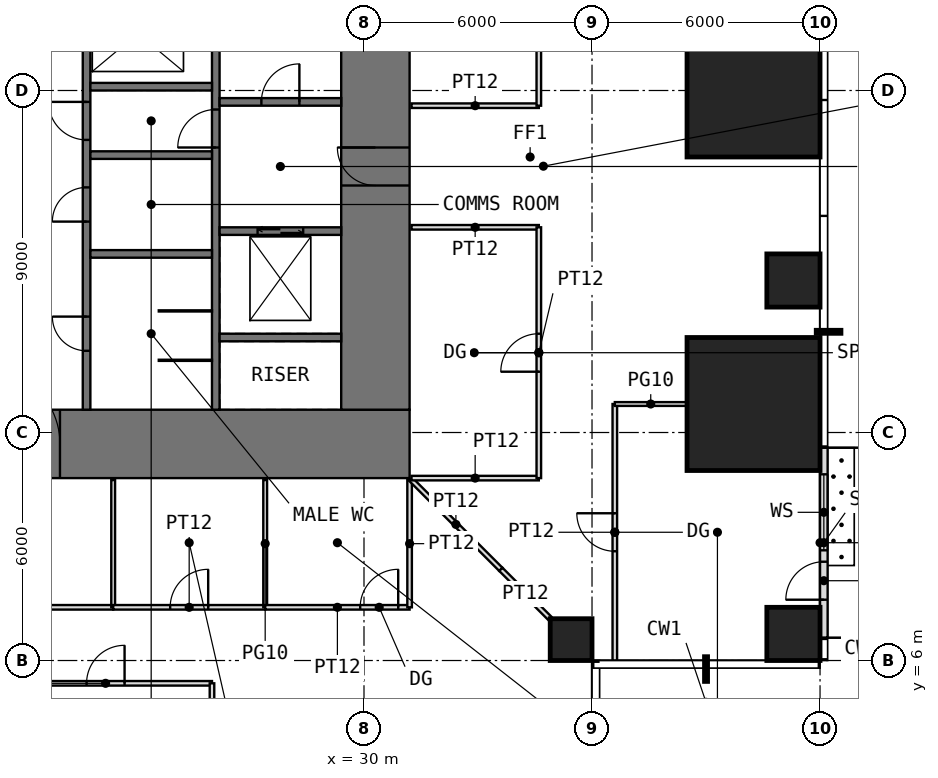
"""IFC4 building model, lengths in metres.
Left out: names, types, materials, properties, quantities, classifications, styles, units other than length and angle.
Written with IfcOpenShell. Run it as: python <this file> out.ifc"""

import sys

from ifc_helpers import new_model, si_unit, direction, frame, frame_2d, origin, origin_2d, place, context, subcontext, project, spatial, rectangle, extrude, element, fill, save


model = new_model("IFC4")
c1 = context("Model", 3, precision=1e-05, world=origin(), true_north=direction((0.0, 1.0)))
c2 = subcontext(c1, "Body", "Model", "MODEL_VIEW")
j1 = project(units=[si_unit("LENGTHUNIT", "METRE"), si_unit("PLANEANGLEUNIT", "RADIAN")], contexts=[c1])
p1 = place(None, origin())
s1 = spatial("IfcSite", under=j1, at=p1, CompositionType="ELEMENT")
p2 = place(p1, origin())
s2 = spatial("IfcBuilding", under=s1, at=p2, CompositionType="ELEMENT")
p3 = place(p2, frame((0.0, 0.0, 42.5)))
s3 = spatial("IfcBuildingStorey", under=s2, at=p3, CompositionType="ELEMENT", Elevation=42.5)
p4 = place(p3, frame((35.45, 6.55, 0.0), z_axis=(0.0, 0.0, 1.0), x_axis=(1.0, 0.0, 0.0)))
e1 = element("IfcColumn", 1, at=p4, inside=s3, PredefinedType="COLUMN", context=c2, shape_type="SweptSolid", body=[
    extrude(rectangle(XDim=1.1, YDim=1.1, at=origin_2d()), origin(), (0.0, 0.0, 1.0), 4.0),
])
p5 = place(p3, frame((41.3, 6.7, 0.0), z_axis=(0.0, 0.0, 1.0), x_axis=(1.0, 0.0, 0.0)))
e2 = element("IfcColumn", 2, at=p5, inside=s3, PredefinedType="COLUMN", context=c2, shape_type="SweptSolid", body=[
    extrude(rectangle(XDim=1.4, YDim=1.4, at=origin_2d()), origin(), (0.0, 0.0, 1.0), 4.0),
])
p6 = place(p3, frame((40.25, 12.75, 0.0), z_axis=(0.0, 0.0, 1.0), x_axis=(1.0, 0.0, 0.0)))
e3 = element("IfcColumn", 3, at=p6, inside=s3, PredefinedType="COLUMN", context=c2, shape_type="SweptSolid", body=[
    extrude(rectangle(XDim=3.5, YDim=3.5, at=origin_2d()), origin(), (0.0, 0.0, 1.0), 4.0),
])
p7 = place(p3, frame((41.3, 16.0, 0.0), z_axis=(0.0, 0.0, 1.0), x_axis=(1.0, 0.0, 0.0)))
e4 = element("IfcColumn", 4, at=p7, inside=s3, PredefinedType="COLUMN", context=c2, shape_type="SweptSolid", body=[
    extrude(rectangle(XDim=1.4, YDim=1.4, at=origin_2d()), origin(), (0.0, 0.0, 1.0), 4.0),
])
p8 = place(p3, frame((40.25, 21.0, 0.0), z_axis=(0.0, 0.0, 1.0), x_axis=(1.0, 0.0, 0.0)))
e5 = element("IfcColumn", 5, at=p8, inside=s3, PredefinedType="COLUMN", context=c2, shape_type="SweptSolid", body=[
    extrude(rectangle(XDim=3.5, YDim=3.5, at=origin_2d()), origin(), (0.0, 0.0, 1.0), 4.0),
])
p9 = place(p3, frame((42.1, 6.6, 0.0), z_axis=(0.0, 0.0, 1.0), x_axis=(0.0, 1.0, 0.0)))
e6 = element("IfcWall", 6, at=p9, inside=s3, PredefinedType="USERDEFINED", context=c2, shape_type="SweptSolid", body=[
    extrude(rectangle(XDim=5.0, YDim=0.2, at=frame_2d((2.5, 0.0))), origin(), (0.0, 0.0, 1.0), 3.75),
])
p10 = place(p9, frame((1.0, 0.0, 0.0)))
e7 = element("IfcOpeningElement", 7, at=p10, cuts=e6, PredefinedType="OPENING", context=c2, shape_type="SweptSolid", body=[
    extrude(rectangle(XDim=1.0, YDim=2.4, at=frame_2d((0.5, 1.2))), frame((0.0, 0.11, 0.0), z_axis=(0.0, -1.0, 0.0), x_axis=(1.0, 0.0, 0.0)), (0.0, 0.0, 1.0), 0.22),
])
p11 = place(p9, frame((2.3, 0.0, 0.3)))
e8 = element("IfcOpeningElement", 8, at=p11, cuts=e6, PredefinedType="OPENING", context=c2, shape_type="SweptSolid", body=[
    extrude(rectangle(XDim=2.0, YDim=2.7, at=frame_2d((1.0, 1.35))), frame((0.0, 0.11, 0.0), z_axis=(0.0, -1.0, 0.0), x_axis=(1.0, 0.0, 0.0)), (0.0, 0.0, 1.0), 0.22),
])
p12 = place(p3, frame((10.8, 11.7, -0.05), z_axis=(0.0, 0.0, 1.0), x_axis=(1.0, 0.0, 0.0)))
e9 = element("IfcWall", 9, at=p12, inside=s3, PredefinedType="SHEAR", context=c2, shape_type="SweptSolid", body=[
    extrude(rectangle(XDim=20.4, YDim=1.8, at=frame_2d((10.2, 0.0))), origin(), (0.0, 0.0, 1.0), 4.0),
])
p13 = place(p12, frame((9.2, 0.0, 0.05)))
e10 = element("IfcOpeningElement", 10, at=p13, cuts=e9, PredefinedType="OPENING", context=c2, shape_type="SweptSolid", body=[
    extrude(rectangle(XDim=2.0, YDim=2.2, at=frame_2d((1.0, 1.1))), frame((0.0, 0.91, 0.0), z_axis=(0.0, -1.0, 0.0), x_axis=(1.0, 0.0, 0.0)), (0.0, 0.0, 1.0), 1.82),
])
p14 = place(p3, frame((30.3, 12.6, -0.05), z_axis=(0.0, 0.0, 1.0), x_axis=(0.0, 1.0, 0.0)))
e11 = element("IfcWall", 11, at=p14, inside=s3, PredefinedType="SHEAR", context=c2, shape_type="SweptSolid", body=[
    extrude(rectangle(XDim=16.8, YDim=1.8, at=frame_2d((8.4, 0.0))), origin(), (0.0, 0.0, 1.0), 4.0),
])
p15 = place(p14, frame((5.9, 0.0, 0.05)))
e12 = element("IfcOpeningElement", 12, at=p15, cuts=e11, PredefinedType="OPENING", context=c2, shape_type="SweptSolid", body=[
    extrude(rectangle(XDim=1.0, YDim=2.2, at=frame_2d((0.5, 1.1))), frame((0.0, 0.91, 0.0), z_axis=(0.0, -1.0, 0.0), x_axis=(1.0, 0.0, 0.0)), (0.0, 0.0, 1.0), 1.82),
])
p16 = place(p3, frame((22.7, 12.6, -0.05), z_axis=(0.0, 0.0, 1.0), x_axis=(0.0, 1.0, 0.0)))
e13 = element("IfcWall", 13, at=p16, inside=s3, PredefinedType="SHEAR", context=c2, shape_type="SweptSolid", body=[
    extrude(rectangle(XDim=16.8, YDim=0.2, at=frame_2d((8.4, 0.0))), origin(), (0.0, 0.0, 1.0), 4.0),
])
p17 = place(p16, frame((7.1, 0.0, 0.05)))
e14 = element("IfcOpeningElement", 14, at=p17, cuts=e13, PredefinedType="OPENING", context=c2, shape_type="SweptSolid", body=[
    extrude(rectangle(XDim=1.0, YDim=2.2, at=frame_2d((0.5, 1.1))), frame((0.0, 0.11, 0.0), z_axis=(0.0, -1.0, 0.0), x_axis=(1.0, 0.0, 0.0)), (0.0, 0.0, 1.0), 0.22),
])
p18 = place(p16, frame((1.55, 0.0, 0.05)))
e15 = element("IfcOpeningElement", 15, at=p18, cuts=e13, PredefinedType="OPENING", context=c2, shape_type="SweptSolid", body=[
    extrude(rectangle(XDim=0.9, YDim=2.2, at=frame_2d((0.45, 1.1))), frame((0.0, 0.11, 0.0), z_axis=(0.0, -1.0, 0.0), x_axis=(1.0, 0.0, 0.0)), (0.0, 0.0, 1.0), 0.22),
])
p19 = place(p16, frame((4.95, 0.0, 0.05)))
e16 = element("IfcOpeningElement", 16, at=p19, cuts=e13, PredefinedType="OPENING", context=c2, shape_type="SweptSolid", body=[
    extrude(rectangle(XDim=0.9, YDim=2.2, at=frame_2d((0.45, 1.1))), frame((0.0, 0.11, 0.0), z_axis=(0.0, -1.0, 0.0), x_axis=(1.0, 0.0, 0.0)), (0.0, 0.0, 1.0), 0.22),
])
p20 = place(p3, frame((26.1, 12.6, -0.05), z_axis=(0.0, 0.0, 1.0), x_axis=(0.0, 1.0, 0.0)))
e17 = element("IfcWall", 17, at=p20, inside=s3, PredefinedType="SHEAR", context=c2, shape_type="SweptSolid", body=[
    extrude(rectangle(XDim=16.8, YDim=0.2, at=frame_2d((8.4, 0.0))), origin(), (0.0, 0.0, 1.0), 4.0),
])
p21 = place(p20, frame((6.9, 0.0, 0.05)))
e18 = element("IfcOpeningElement", 18, at=p21, cuts=e17, PredefinedType="OPENING", context=c2, shape_type="SweptSolid", body=[
    extrude(rectangle(XDim=1.0, YDim=2.2, at=frame_2d((0.5, 1.1))), frame((0.0, 0.11, 0.0), z_axis=(0.0, -1.0, 0.0), x_axis=(1.0, 0.0, 0.0)), (0.0, 0.0, 1.0), 0.22),
])
for number, where, z_axis, x_axis in (
    (19, (22.8, 16.7, -0.05), (0.0, 0.0, 1.0), (1.0, 0.0, 0.0)),
    (20, (22.8, 19.3, -0.05), (0.0, 0.0, 1.0), (1.0, 0.0, 0.0)),
    (21, (22.8, 21.1, -0.05), (0.0, 0.0, 1.0), (1.0, 0.0, 0.0)),
    (22, (26.2, 14.5, -0.05), (0.0, 0.0, 1.0), (1.0, 0.0, 0.0)),
):
    element("IfcWall", number, at=place(p3, frame(where, z_axis=z_axis, x_axis=x_axis)), inside=s3, PredefinedType="SHEAR", context=c2, shape_type="SweptSolid", body=[
        extrude(rectangle(XDim=3.2, YDim=0.2, at=frame_2d((1.6, 0.0))), origin(), (0.0, 0.0, 1.0), 4.0),
    ])
p22 = place(p3, frame((26.2, 17.3, -0.05), z_axis=(0.0, 0.0, 1.0), x_axis=(1.0, 0.0, 0.0)))
e23 = element("IfcWall", 23, at=p22, inside=s3, PredefinedType="SHEAR", context=c2, shape_type="SweptSolid", body=[
    extrude(rectangle(XDim=3.2, YDim=0.2, at=frame_2d((1.6, 0.0))), origin(), (0.0, 0.0, 1.0), 4.0),
])
p23 = place(p22, frame((1.0, 0.0, 0.05)))
e24 = element("IfcOpeningElement", 24, at=p23, cuts=e23, PredefinedType="OPENING", context=c2, shape_type="SweptSolid", body=[
    extrude(rectangle(XDim=1.2, YDim=2.2, at=frame_2d((0.6, 1.1))), frame((0.0, 0.11, 0.0), z_axis=(0.0, -1.0, 0.0), x_axis=(1.0, 0.0, 0.0)), (0.0, 0.0, 1.0), 0.22),
])
p24 = place(p3, frame((26.2, 20.7, -0.05), z_axis=(0.0, 0.0, 1.0), x_axis=(1.0, 0.0, 0.0)))
e25 = element("IfcWall", 25, at=p24, inside=s3, PredefinedType="SHEAR", context=c2, shape_type="SweptSolid", body=[
    extrude(rectangle(XDim=3.2, YDim=0.2, at=frame_2d((1.6, 0.0))), origin(), (0.0, 0.0, 1.0), 4.0),
])
p25 = place(p24, frame((1.1, 0.0, 0.05)))
e26 = element("IfcOpeningElement", 26, at=p25, cuts=e25, PredefinedType="OPENING", context=c2, shape_type="SweptSolid", body=[
    extrude(rectangle(XDim=1.0, YDim=2.2, at=frame_2d((0.5, 1.1))), frame((0.0, 0.11, 0.0), z_axis=(0.0, -1.0, 0.0), x_axis=(1.0, 0.0, 0.0)), (0.0, 0.0, 1.0), 0.22),
])
for number, where, z_axis, x_axis in (
    (27, (24.6, 13.9, 0.0), (0.0, 0.0, 1.0), (1.0, 0.0, 0.0)),
    (28, (24.6, 15.2, 0.0), (0.0, 0.0, 1.0), (1.0, 0.0, 0.0)),
):
    element("IfcWall", number, at=place(p3, frame(where, z_axis=z_axis, x_axis=x_axis)), inside=s3, PredefinedType="PARTITIONING", context=c2, shape_type="SweptSolid", body=[
        extrude(rectangle(XDim=1.4, YDim=0.03, at=frame_2d((0.7, 0.0))), origin(), (0.0, 0.0, 1.0), 3.75),
    ])
p26 = place(p3, frame((18.6, 7.4, 0.0), z_axis=(0.0, 0.0, 1.0), x_axis=(1.0, 0.0, 0.0)))
e29 = element("IfcWall", 29, at=p26, inside=s3, PredefinedType="PARTITIONING", context=c2, shape_type="SweptSolid", body=[
    extrude(rectangle(XDim=4.8, YDim=0.12, at=frame_2d((2.4, 0.0))), origin(), (0.0, 0.0, 1.0), 3.75),
])
p27 = place(p26, frame((1.9, 0.0, 0.0)))
e30 = element("IfcOpeningElement", 30, at=p27, cuts=e29, PredefinedType="OPENING", context=c2, shape_type="SweptSolid", body=[
    extrude(rectangle(XDim=1.0, YDim=2.4, at=frame_2d((0.5, 1.2))), frame((0.0, 0.07, 0.0), z_axis=(0.0, -1.0, 0.0), x_axis=(1.0, 0.0, 0.0)), (0.0, 0.0, 1.0), 0.14),
])
p28 = place(p3, frame((21.0, 5.4, 0.0), z_axis=(0.0, 0.0, 1.0), x_axis=(1.0, 0.0, 0.0)))
e31 = element("IfcWall", 31, at=p28, inside=s3, PredefinedType="PARTITIONING", context=c2, shape_type="SweptSolid", body=[
    extrude(rectangle(XDim=5.0, YDim=0.12, at=frame_2d((2.5, 0.0))), origin(), (0.0, 0.0, 1.0), 3.75),
])
p29 = place(p28, frame((1.7, 0.0, 0.0)))
e32 = element("IfcOpeningElement", 32, at=p29, cuts=e31, PredefinedType="OPENING", context=c2, shape_type="SweptSolid", body=[
    extrude(rectangle(XDim=1.0, YDim=2.2, at=frame_2d((0.5, 1.1))), frame((0.0, 0.07, 0.0), z_axis=(0.0, -1.0, 0.0), x_axis=(1.0, 0.0, 0.0)), (0.0, 0.0, 1.0), 0.14),
])
p30 = place(p3, frame((23.4, 7.4, 0.0), z_axis=(0.0, 0.0, 1.0), x_axis=(0.0, 1.0, 0.0)))
e33 = element("IfcWall", 33, at=p30, inside=s3, PredefinedType="PARTITIONING", context=c2, shape_type="SweptSolid", body=[
    extrude(rectangle(XDim=3.35, YDim=0.1, at=frame_2d((1.675, 0.0))), origin(), (0.0, 0.0, 1.0), 3.75),
])
p31 = place(p3, frame((23.4, 7.4, 0.0), z_axis=(0.0, 0.0, 1.0), x_axis=(1.0, 0.0, 0.0)))
e34 = element("IfcWall", 34, at=p31, inside=s3, PredefinedType="PARTITIONING", context=c2, shape_type="SweptSolid", body=[
    extrude(rectangle(XDim=4.0, YDim=0.12, at=frame_2d((2.0, 0.0))), origin(), (0.0, 0.0, 1.0), 3.75),
])
p32 = place(p31, frame((1.5, 0.0, 0.0)))
e35 = element("IfcOpeningElement", 35, at=p32, cuts=e34, PredefinedType="OPENING", context=c2, shape_type="SweptSolid", body=[
    extrude(rectangle(XDim=1.0, YDim=2.4, at=frame_2d((0.5, 1.2))), frame((0.0, 0.07, 0.0), z_axis=(0.0, -1.0, 0.0), x_axis=(1.0, 0.0, 0.0)), (0.0, 0.0, 1.0), 0.14),
])
p33 = place(p3, frame((26.0, 1.41, 0.0), z_axis=(0.0, 0.0, 1.0), x_axis=(0.0, 1.0, 0.0)))
e36 = element("IfcWall", 36, at=p33, inside=s3, PredefinedType="PARTITIONING", context=c2, shape_type="SweptSolid", body=[
    extrude(rectangle(XDim=3.99, YDim=0.12, at=frame_2d((1.995, 0.0))), origin(), (0.0, 0.0, 1.0), 3.75),
])
p34 = place(p3, frame((27.4, 7.4, 0.0), z_axis=(0.0, 0.0, 1.0), x_axis=(0.0, 1.0, 0.0)))
e37 = element("IfcWall", 37, at=p34, inside=s3, PredefinedType="PARTITIONING", context=c2, shape_type="SweptSolid", body=[
    extrude(rectangle(XDim=3.35, YDim=0.1, at=frame_2d((1.675, 0.0))), origin(), (0.0, 0.0, 1.0), 3.75),
])
p35 = place(p3, frame((27.4, 7.4, 0.0), z_axis=(0.0, 0.0, 1.0), x_axis=(1.0, 0.0, 0.0)))
e38 = element("IfcWall", 38, at=p35, inside=s3, PredefinedType="PARTITIONING", context=c2, shape_type="SweptSolid", body=[
    extrude(rectangle(XDim=3.8, YDim=0.12, at=frame_2d((1.9, 0.0))), origin(), (0.0, 0.0, 1.0), 3.75),
])
p36 = place(p35, frame((2.5, 0.0, 0.0)))
e39 = element("IfcOpeningElement", 39, at=p36, cuts=e38, PredefinedType="OPENING", context=c2, shape_type="SweptSolid", body=[
    extrude(rectangle(XDim=1.0, YDim=2.4, at=frame_2d((0.5, 1.2))), frame((0.0, 0.07, 0.0), z_axis=(0.0, -1.0, 0.0), x_axis=(1.0, 0.0, 0.0)), (0.0, 0.0, 1.0), 0.14),
])
p37 = place(p3, frame((31.2, 7.4, 0.0), z_axis=(0.0, 0.0, 1.0), x_axis=(0.0, 1.0, 0.0)))
e40 = element("IfcWall", 40, at=p37, inside=s3, PredefinedType="PARTITIONING", context=c2, shape_type="SweptSolid", body=[
    extrude(rectangle(XDim=3.35, YDim=0.12, at=frame_2d((1.675, 0.0))), origin(), (0.0, 0.0, 1.0), 3.75),
])
p38 = place(p3, frame((31.235, 10.765, 0.0), z_axis=(0.0, 0.0, 1.0), x_axis=(0.707106781187, -0.707106781187, 0.0)))
e41 = element("IfcWall", 41, at=p38, inside=s3, PredefinedType="PARTITIONING", context=c2, shape_type="SweptSolid", body=[
    extrude(rectangle(XDim=3.346, YDim=0.12, at=frame_2d((1.673, 0.0))), origin(), (0.0, 0.0, 1.0), 3.75),
])
for number, where, z_axis, x_axis in (
    (42, (31.25, 10.8, 0.0), (0.0, 0.0, 1.0), (1.0, 0.0, 0.0)),
    (43, (31.25, 17.4, 0.0), (0.0, 0.0, 1.0), (1.0, 0.0, 0.0)),
    (44, (31.25, 20.6, 0.0), (0.0, 0.0, 1.0), (1.0, 0.0, 0.0)),
):
    element("IfcWall", number, at=place(p3, frame(where, z_axis=z_axis, x_axis=x_axis)), inside=s3, PredefinedType="PARTITIONING", context=c2, shape_type="SweptSolid", body=[
        extrude(rectangle(XDim=3.35, YDim=0.12, at=frame_2d((1.675, 0.0))), origin(), (0.0, 0.0, 1.0), 3.75),
    ])
p39 = place(p3, frame((33.602, 8.398, 0.0), z_axis=(0.0, 0.0, 1.0), x_axis=(0.707106781187, -0.707106781187, 0.0)))
e45 = element("IfcWall", 45, at=p39, inside=s3, PredefinedType="PARTITIONING", context=c2, shape_type="SweptSolid", body=[
    extrude(rectangle(XDim=1.822, YDim=0.12, at=frame_2d((0.911, 0.0))), origin(), (0.0, 0.0, 1.0), 3.75),
])
p40 = place(p3, frame((34.6, 10.8, 0.0), z_axis=(0.0, 0.0, 1.0), x_axis=(0.0, 1.0, 0.0)))
e46 = element("IfcWall", 46, at=p40, inside=s3, PredefinedType="PARTITIONING", context=c2, shape_type="SweptSolid", body=[
    extrude(rectangle(XDim=6.6, YDim=0.12, at=frame_2d((3.3, 0.0))), origin(), (0.0, 0.0, 1.0), 3.75),
])
p41 = place(p40, frame((2.8, 0.0, 0.0)))
e47 = element("IfcOpeningElement", 47, at=p41, cuts=e46, PredefinedType="OPENING", context=c2, shape_type="SweptSolid", body=[
    extrude(rectangle(XDim=1.0, YDim=2.4, at=frame_2d((0.5, 1.2))), frame((0.0, 0.07, 0.0), z_axis=(0.0, -1.0, 0.0), x_axis=(1.0, 0.0, 0.0)), (0.0, 0.0, 1.0), 0.14),
])
p42 = place(p3, frame((34.6, 20.6, 0.0), z_axis=(0.0, 0.0, 1.0), x_axis=(0.0, 1.0, 0.0)))
e48 = element("IfcWall", 48, at=p42, inside=s3, PredefinedType="PARTITIONING", context=c2, shape_type="SweptSolid", body=[
    extrude(rectangle(XDim=4.8, YDim=0.12, at=frame_2d((2.4, 0.0))), origin(), (0.0, 0.0, 1.0), 3.75),
])
p43 = place(p42, frame((1.9, 0.0, 0.0)))
e49 = element("IfcOpeningElement", 49, at=p43, cuts=e48, PredefinedType="OPENING", context=c2, shape_type="SweptSolid", body=[
    extrude(rectangle(XDim=1.0, YDim=2.4, at=frame_2d((0.5, 1.2))), frame((0.0, 0.07, 0.0), z_axis=(0.0, -1.0, 0.0), x_axis=(1.0, 0.0, 0.0)), (0.0, 0.0, 1.0), 0.14),
])
p44 = place(p3, frame((36.6, 6.0, 0.0), z_axis=(0.0, 0.0, 1.0), x_axis=(0.0, 1.0, 0.0)))
e50 = element("IfcWall", 50, at=p44, inside=s3, PredefinedType="PARTITIONING", context=c2, shape_type="SweptSolid", body=[
    extrude(rectangle(XDim=6.75, YDim=0.12, at=frame_2d((3.375, 0.0))), origin(), (0.0, 0.0, 1.0), 3.75),
])
p45 = place(p44, frame((2.875, 0.0, 0.0)))
e51 = element("IfcOpeningElement", 51, at=p45, cuts=e50, PredefinedType="OPENING", context=c2, shape_type="SweptSolid", body=[
    extrude(rectangle(XDim=1.0, YDim=2.4, at=frame_2d((0.5, 1.2))), frame((0.0, 0.07, 0.0), z_axis=(0.0, -1.0, 0.0), x_axis=(1.0, 0.0, 0.0)), (0.0, 0.0, 1.0), 0.14),
])
p46 = place(p3, frame((36.6, 12.75, 0.0), z_axis=(0.0, 0.0, 1.0), x_axis=(1.0, 0.0, 0.0)))
e52 = element("IfcWall", 52, at=p46, inside=s3, PredefinedType="PARTITIONING", context=c2, shape_type="SweptSolid", body=[
    extrude(rectangle(XDim=1.89, YDim=0.1, at=frame_2d((0.945, 0.0))), origin(), (0.0, 0.0, 1.0), 3.75),
])
p47 = place(p10, origin())
e53 = element("IfcDoor", 53, at=p47, inside=s3, OperationType="SINGLE_SWING_LEFT", PredefinedType="DOOR", context=c2, shape_type="SweptSolid", body=[
    extrude(rectangle(XDim=1.0, YDim=2.4, at=frame_2d((0.5, 1.2))), frame((0.0, 0.025, 0.0), z_axis=(0.0, -1.0, 0.0), x_axis=(1.0, 0.0, 0.0)), (0.0, 0.0, 1.0), 0.05),
])
fill(e7, e53)
p48 = place(p11, origin())
e54 = element("IfcWindow", 54, at=p48, inside=s3, PartitioningType="SINGLE_PANEL", PredefinedType="WINDOW", context=c2, shape_type="SweptSolid", body=[
    extrude(rectangle(XDim=2.0, YDim=2.7, at=frame_2d((1.0, 1.35))), frame((0.0, 0.03, 0.0), z_axis=(0.0, -1.0, 0.0), x_axis=(1.0, 0.0, 0.0)), (0.0, 0.0, 1.0), 0.06),
])
fill(e8, e54)
p49 = place(p13, origin())
e55 = element("IfcDoor", 55, at=p49, inside=s3, OperationType="DOUBLE_DOOR_SINGLE_SWING", PredefinedType="DOOR", context=c2, shape_type="SweptSolid", body=[
    extrude(rectangle(XDim=2.0, YDim=2.2, at=frame_2d((1.0, 1.1))), frame((0.0, 0.025, 0.0), z_axis=(0.0, -1.0, 0.0), x_axis=(1.0, 0.0, 0.0)), (0.0, 0.0, 1.0), 0.05),
])
fill(e10, e55)
p50 = place(p15, origin())
e56 = element("IfcDoor", 56, at=p50, inside=s3, OperationType="SINGLE_SWING_RIGHT", PredefinedType="DOOR", context=c2, shape_type="SweptSolid", body=[
    extrude(rectangle(XDim=1.0, YDim=2.2, at=frame_2d((0.5, 1.1))), frame((0.0, 0.025, 0.0), z_axis=(0.0, -1.0, 0.0), x_axis=(1.0, 0.0, 0.0)), (0.0, 0.0, 1.0), 0.05),
])
fill(e12, e56)
p51 = place(p25, origin())
e57 = element("IfcDoor", 57, at=p51, inside=s3, OperationType="SINGLE_SWING_RIGHT", PredefinedType="DOOR", context=c2, shape_type="SweptSolid", body=[
    extrude(rectangle(XDim=1.0, YDim=2.2, at=frame_2d((0.5, 1.1))), frame((0.0, 0.025, 0.0), z_axis=(0.0, -1.0, 0.0), x_axis=(1.0, 0.0, 0.0)), (0.0, 0.0, 1.0), 0.05),
])
fill(e26, e57)
p52 = place(p21, origin())
e58 = element("IfcDoor", 58, at=p52, inside=s3, OperationType="SINGLE_SWING_LEFT", PredefinedType="DOOR", context=c2, shape_type="SweptSolid", body=[
    extrude(rectangle(XDim=1.0, YDim=2.2, at=frame_2d((0.5, 1.1))), frame((0.0, 0.025, 0.0), z_axis=(0.0, -1.0, 0.0), x_axis=(1.0, 0.0, 0.0)), (0.0, 0.0, 1.0), 0.05),
])
fill(e18, e58)
p53 = place(p17, origin())
e59 = element("IfcDoor", 59, at=p53, inside=s3, OperationType="SINGLE_SWING_RIGHT", PredefinedType="DOOR", context=c2, shape_type="SweptSolid", body=[
    extrude(rectangle(XDim=1.0, YDim=2.2, at=frame_2d((0.5, 1.1))), frame((0.0, 0.025, 0.0), z_axis=(0.0, -1.0, 0.0), x_axis=(1.0, 0.0, 0.0)), (0.0, 0.0, 1.0), 0.05),
])
fill(e14, e59)
p54 = place(p18, origin())
e60 = element("IfcDoor", 60, at=p54, inside=s3, OperationType="SINGLE_SWING_RIGHT", PredefinedType="DOOR", context=c2, shape_type="SweptSolid", body=[
    extrude(rectangle(XDim=0.9, YDim=2.2, at=frame_2d((0.45, 1.1))), frame((0.0, 0.025, 0.0), z_axis=(0.0, -1.0, 0.0), x_axis=(1.0, 0.0, 0.0)), (0.0, 0.0, 1.0), 0.05),
])
fill(e15, e60)
p55 = place(p19, origin())
e61 = element("IfcDoor", 61, at=p55, inside=s3, OperationType="SINGLE_SWING_LEFT", PredefinedType="DOOR", context=c2, shape_type="SweptSolid", body=[
    extrude(rectangle(XDim=0.9, YDim=2.2, at=frame_2d((0.45, 1.1))), frame((0.0, 0.025, 0.0), z_axis=(0.0, -1.0, 0.0), x_axis=(1.0, 0.0, 0.0)), (0.0, 0.0, 1.0), 0.05),
])
fill(e16, e61)
p56 = place(p32, origin())
e62 = element("IfcDoor", 62, at=p56, inside=s3, OperationType="SINGLE_SWING_RIGHT", PredefinedType="DOOR", context=c2, shape_type="SweptSolid", body=[
    extrude(rectangle(XDim=1.0, YDim=2.4, at=frame_2d((0.5, 1.2))), frame((0.0, 0.025, 0.0), z_axis=(0.0, -1.0, 0.0), x_axis=(1.0, 0.0, 0.0)), (0.0, 0.0, 1.0), 0.05),
])
fill(e35, e62)
p57 = place(p29, origin())
e63 = element("IfcDoor", 63, at=p57, inside=s3, OperationType="SINGLE_SWING_RIGHT", PredefinedType="DOOR", context=c2, shape_type="SweptSolid", body=[
    extrude(rectangle(XDim=1.0, YDim=2.2, at=frame_2d((0.5, 1.1))), frame((0.0, 0.025, 0.0), z_axis=(0.0, -1.0, 0.0), x_axis=(1.0, 0.0, 0.0)), (0.0, 0.0, 1.0), 0.05),
])
fill(e32, e63)
p58 = place(p41, origin())
e64 = element("IfcDoor", 64, at=p58, inside=s3, OperationType="SINGLE_SWING_LEFT", PredefinedType="DOOR", context=c2, shape_type="SweptSolid", body=[
    extrude(rectangle(XDim=1.0, YDim=2.4, at=frame_2d((0.5, 1.2))), frame((0.0, 0.025, 0.0), z_axis=(0.0, -1.0, 0.0), x_axis=(1.0, 0.0, 0.0)), (0.0, 0.0, 1.0), 0.05),
])
fill(e47, e64)
p59 = place(p45, origin())
e65 = element("IfcDoor", 65, at=p59, inside=s3, OperationType="SINGLE_SWING_RIGHT", PredefinedType="DOOR", context=c2, shape_type="SweptSolid", body=[
    extrude(rectangle(XDim=1.0, YDim=2.4, at=frame_2d((0.5, 1.2))), frame((0.0, 0.025, 0.0), z_axis=(0.0, -1.0, 0.0), x_axis=(1.0, 0.0, 0.0)), (0.0, 0.0, 1.0), 0.05),
])
fill(e51, e65)
p60 = place(p36, origin())
e66 = element("IfcDoor", 66, at=p60, inside=s3, OperationType="SINGLE_SWING_RIGHT", PredefinedType="DOOR", context=c2, shape_type="SweptSolid", body=[
    extrude(rectangle(XDim=1.0, YDim=2.4, at=frame_2d((0.5, 1.2))), frame((0.0, 0.025, 0.0), z_axis=(0.0, -1.0, 0.0), x_axis=(1.0, 0.0, 0.0)), (0.0, 0.0, 1.0), 0.05),
])
fill(e39, e66)
p61 = place(p23, origin())
e67 = element("IfcDoor", 67, at=p61, inside=s3, OperationType="DOUBLE_DOOR_SLIDING", PredefinedType="DOOR", context=c2, shape_type="SweptSolid", body=[
    extrude(rectangle(XDim=1.2, YDim=2.2, at=frame_2d((0.6, 1.1))), frame((0.0, 0.025, 0.0), z_axis=(0.0, -1.0, 0.0), x_axis=(1.0, 0.0, 0.0)), (0.0, 0.0, 1.0), 0.05),
])
fill(e24, e67)
save(model, sys.argv[1])
